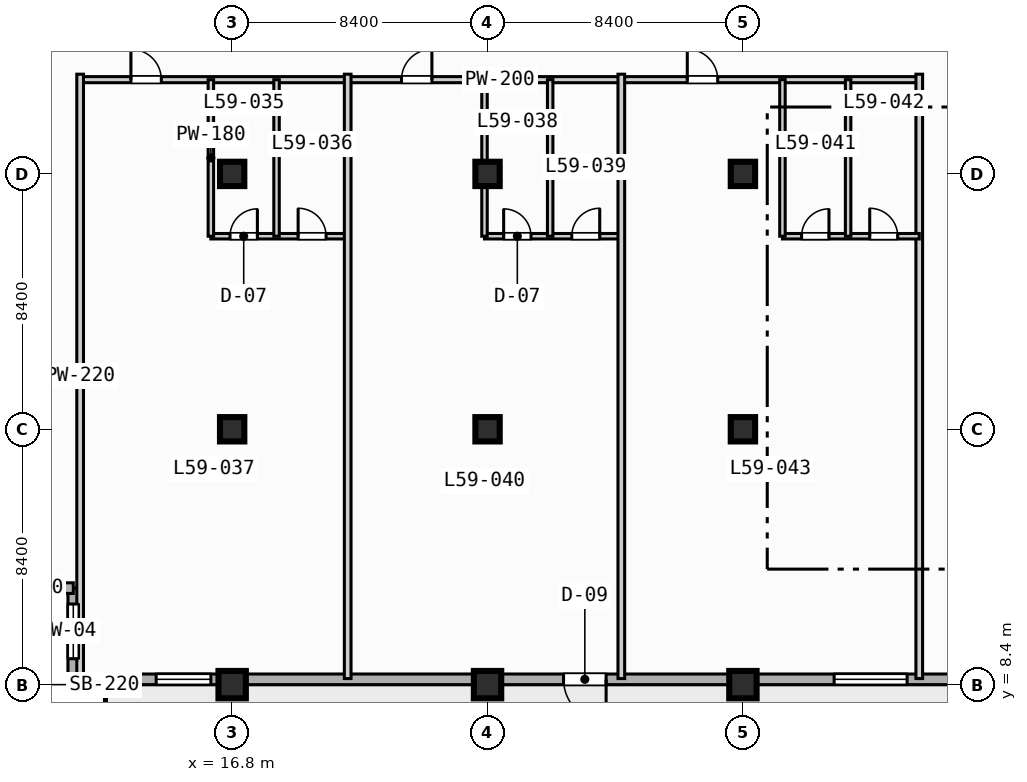
"""IFC4 building model, lengths in metres.
Left out: names, types, materials, properties, quantities, classifications, styles, units other than length and angle.
Written with IfcOpenShell. Run it as: python <this file> out.ifc"""

import sys

from ifc_helpers import new_model, si_unit, direction, frame, frame_2d, origin, origin_2d, place, context, subcontext, project, spatial, rectangle, extrude, element, fill, save


model = new_model("IFC4")
c1 = context("Model", 3, precision=1e-05, world=origin(), true_north=direction((0.0, 1.0)))
c2 = subcontext(c1, "Body", "Model", "MODEL_VIEW")
j1 = project(units=[si_unit("LENGTHUNIT", "METRE"), si_unit("PLANEANGLEUNIT", "RADIAN")], contexts=[c1])
p1 = place(None, origin())
s1 = spatial("IfcSite", under=j1, at=p1, CompositionType="ELEMENT")
p2 = place(p1, origin())
s2 = spatial("IfcBuilding", under=s1, at=p2, CompositionType="ELEMENT")
p3 = place(p2, frame((0.0, 0.0, 241.6)))
s3 = spatial("IfcBuildingStorey", under=s2, at=p3, CompositionType="ELEMENT", Elevation=241.6)
p4 = place(p3, frame((16.8, 8.4, 0.0), z_axis=(0.0, 0.0, 1.0), x_axis=(1.0, 0.0, 0.0)))
e1 = element("IfcColumn", 1, at=p4, inside=s3, PredefinedType="COLUMN", context=c2, shape_type="SweptSolid", body=[
    extrude(rectangle(XDim=0.9, YDim=0.9, at=origin_2d()), origin(), (0.0, 0.0, 1.0), 3.7),
])
for number, where, z_axis, x_axis in (
    (2, (16.8, 16.8, 0.0), (0.0, 0.0, 1.0), (1.0, 0.0, 0.0)),
    (3, (16.8, 25.2, 0.0), (0.0, 0.0, 1.0), (1.0, 0.0, 0.0)),
):
    element("IfcColumn", number, at=place(p3, frame(where, z_axis=z_axis, x_axis=x_axis)), inside=s3, PredefinedType="COLUMN", context=c2, shape_type="SweptSolid", body=[
        extrude(rectangle(XDim=0.8, YDim=0.8, at=origin_2d()), origin(), (0.0, 0.0, 1.0), 3.7),
    ])
p5 = place(p3, frame((25.2, 8.4, 0.0), z_axis=(0.0, 0.0, 1.0), x_axis=(1.0, 0.0, 0.0)))
e4 = element("IfcColumn", 4, at=p5, inside=s3, PredefinedType="COLUMN", context=c2, shape_type="SweptSolid", body=[
    extrude(rectangle(XDim=0.9, YDim=0.9, at=origin_2d()), origin(), (0.0, 0.0, 1.0), 3.7),
])
for number, where, z_axis, x_axis in (
    (5, (25.2, 16.8, 0.0), (0.0, 0.0, 1.0), (1.0, 0.0, 0.0)),
    (6, (25.2, 25.2, 0.0), (0.0, 0.0, 1.0), (1.0, 0.0, 0.0)),
):
    element("IfcColumn", number, at=place(p3, frame(where, z_axis=z_axis, x_axis=x_axis)), inside=s3, PredefinedType="COLUMN", context=c2, shape_type="SweptSolid", body=[
        extrude(rectangle(XDim=0.8, YDim=0.8, at=origin_2d()), origin(), (0.0, 0.0, 1.0), 3.7),
    ])
p6 = place(p3, frame((33.6, 8.4, 0.0), z_axis=(0.0, 0.0, 1.0), x_axis=(1.0, 0.0, 0.0)))
e7 = element("IfcColumn", 7, at=p6, inside=s3, PredefinedType="COLUMN", context=c2, shape_type="SweptSolid", body=[
    extrude(rectangle(XDim=0.9, YDim=0.9, at=origin_2d()), origin(), (0.0, 0.0, 1.0), 3.7),
])
for number, where, z_axis, x_axis in (
    (8, (33.6, 16.8, 0.0), (0.0, 0.0, 1.0), (1.0, 0.0, 0.0)),
    (9, (33.6, 25.2, 0.0), (0.0, 0.0, 1.0), (1.0, 0.0, 0.0)),
):
    element("IfcColumn", number, at=place(p3, frame(where, z_axis=z_axis, x_axis=x_axis)), inside=s3, PredefinedType="COLUMN", context=c2, shape_type="SweptSolid", body=[
        extrude(rectangle(XDim=0.8, YDim=0.8, at=origin_2d()), origin(), (0.0, 0.0, 1.0), 3.7),
    ])
p7 = place(p3, frame((11.575, 8.575, 0.0), z_axis=(0.0, 0.0, 1.0), x_axis=(0.0, 1.0, 0.0)))
e10 = element("IfcWall", 10, at=p7, inside=s3, PredefinedType="STANDARD", context=c2, shape_type="SweptSolid", body=[
    extrude(rectangle(XDim=3.0, YDim=0.35, at=frame_2d((1.5, 0.0))), origin(), (0.0, 0.0, 1.0), 3.47),
])
p8 = place(p7, frame((0.677, 0.0, 0.85)))
e11 = element("IfcOpeningElement", 11, at=p8, cuts=e10, PredefinedType="OPENING", context=c2, shape_type="SweptSolid", body=[
    extrude(rectangle(XDim=1.8, YDim=1.8, at=frame_2d((0.9, 0.9))), frame((0.0, 0.185, 0.0), z_axis=(0.0, -1.0, 0.0), x_axis=(1.0, 0.0, 0.0)), (0.0, 0.0, 1.0), 0.37),
])
p9 = place(p3, frame((11.575, 11.575, 0.0), z_axis=(0.0, 0.0, 1.0), x_axis=(-1.0, 0.0, 0.0)))
e12 = element("IfcWall", 12, at=p9, inside=s3, PredefinedType="STANDARD", context=c2, shape_type="SweptSolid", body=[
    extrude(rectangle(XDim=3.0, YDim=0.35, at=frame_2d((1.5, 0.0))), origin(), (0.0, 0.0, 1.0), 3.47),
])
p10 = place(p3, frame((72.425, 8.575, 0.0), z_axis=(0.0, 0.0, 1.0), x_axis=(-1.0, 0.0, 0.0)))
e13 = element("IfcWall", 13, at=p10, inside=s3, PredefinedType="STANDARD", context=c2, shape_type="SweptSolid", body=[
    extrude(rectangle(XDim=60.85, YDim=0.35, at=frame_2d((30.425, 0.0))), origin(), (0.0, 0.0, 1.0), 3.47),
])
p11 = place(p10, frame((43.325, 0.0, 0.0)))
e14 = element("IfcOpeningElement", 14, at=p11, cuts=e13, PredefinedType="OPENING", context=c2, shape_type="SweptSolid", body=[
    extrude(rectangle(XDim=1.4, YDim=2.2, at=frame_2d((0.7, 1.1))), frame((0.0, 0.185, 0.0), z_axis=(0.0, -1.0, 0.0), x_axis=(1.0, 0.0, 0.0)), (0.0, 0.0, 1.0), 0.37),
])
p12 = place(p10, frame((33.425, 0.0, 0.85)))
e15 = element("IfcOpeningElement", 15, at=p12, cuts=e13, PredefinedType="OPENING", context=c2, shape_type="SweptSolid", body=[
    extrude(rectangle(XDim=2.4, YDim=1.95, at=frame_2d((1.2, 0.975))), frame((0.0, 0.185, 0.0), z_axis=(0.0, -1.0, 0.0), x_axis=(1.0, 0.0, 0.0)), (0.0, 0.0, 1.0), 0.37),
])
p13 = place(p10, frame((25.325, 0.0, 0.85)))
e16 = element("IfcOpeningElement", 16, at=p13, cuts=e13, PredefinedType="OPENING", context=c2, shape_type="SweptSolid", body=[
    extrude(rectangle(XDim=1.8, YDim=1.8, at=frame_2d((0.9, 0.9))), frame((0.0, 0.185, 0.0), z_axis=(0.0, -1.0, 0.0), x_axis=(1.0, 0.0, 0.0)), (0.0, 0.0, 1.0), 0.37),
])
p14 = place(p10, frame((56.325, 0.0, 0.85)))
e17 = element("IfcOpeningElement", 17, at=p14, cuts=e13, PredefinedType="OPENING", context=c2, shape_type="SweptSolid", body=[
    extrude(rectangle(XDim=1.8, YDim=1.8, at=frame_2d((0.9, 0.9))), frame((0.0, 0.185, 0.0), z_axis=(0.0, -1.0, 0.0), x_axis=(1.0, 0.0, 0.0)), (0.0, 0.0, 1.0), 0.37),
])
p15 = place(p3, frame((11.8, 28.3, 0.0), z_axis=(0.0, 0.0, 1.0), x_axis=(1.0, 0.0, 0.0)))
e18 = element("IfcWall", 18, at=p15, inside=s3, PredefinedType="PARTITIONING", context=c2, shape_type="SweptSolid", body=[
    extrude(rectangle(XDim=27.6, YDim=0.2, at=frame_2d((13.8, 0.0))), origin(), (0.0, 0.0, 1.0), 3.47),
])
p16 = place(p15, frame((1.67, 0.0, 0.0)))
e19 = element("IfcOpeningElement", 19, at=p16, cuts=e18, PredefinedType="OPENING", context=c2, shape_type="SweptSolid", body=[
    extrude(rectangle(XDim=1.0, YDim=2.15, at=frame_2d((0.5, 1.075))), frame((0.0, 0.11, 0.0), z_axis=(0.0, -1.0, 0.0), x_axis=(1.0, 0.0, 0.0)), (0.0, 0.0, 1.0), 0.22),
])
p17 = place(p15, frame((10.57, 0.0, 0.0)))
e20 = element("IfcOpeningElement", 20, at=p17, cuts=e18, PredefinedType="OPENING", context=c2, shape_type="SweptSolid", body=[
    extrude(rectangle(XDim=1.0, YDim=2.15, at=frame_2d((0.5, 1.075))), frame((0.0, 0.11, 0.0), z_axis=(0.0, -1.0, 0.0), x_axis=(1.0, 0.0, 0.0)), (0.0, 0.0, 1.0), 0.22),
])
p18 = place(p15, frame((19.97, 0.0, 0.0)))
e21 = element("IfcOpeningElement", 21, at=p18, cuts=e18, PredefinedType="OPENING", context=c2, shape_type="SweptSolid", body=[
    extrude(rectangle(XDim=1.0, YDim=2.15, at=frame_2d((0.5, 1.075))), frame((0.0, 0.11, 0.0), z_axis=(0.0, -1.0, 0.0), x_axis=(1.0, 0.0, 0.0)), (0.0, 0.0, 1.0), 0.22),
])
p19 = place(p3, frame((11.8, 8.6, 0.0), z_axis=(0.0, 0.0, 1.0), x_axis=(0.0, 1.0, 0.0)))
e22 = element("IfcWall", 22, at=p19, inside=s3, PredefinedType="PARTITIONING", context=c2, shape_type="SweptSolid", body=[
    extrude(rectangle(XDim=19.88, YDim=0.22, at=frame_2d((9.94, 0.0))), origin(), (0.0, 0.0, 1.0), 3.47),
])
p20 = place(p3, frame((16.1, 23.15, 0.0), z_axis=(0.0, 0.0, 1.0), x_axis=(1.0, 0.0, 0.0)))
e23 = element("IfcWall", 23, at=p20, inside=s3, PredefinedType="PLUMBINGWALL", context=c2, shape_type="SweptSolid", body=[
    extrude(rectangle(XDim=4.5, YDim=0.18, at=frame_2d((2.25, 0.0))), origin(), (0.0, 0.0, 1.0), 3.47),
])
p21 = place(p20, frame((0.63, 0.0, 0.0)))
e24 = element("IfcOpeningElement", 24, at=p21, cuts=e23, PredefinedType="OPENING", context=c2, shape_type="SweptSolid", body=[
    extrude(rectangle(XDim=0.9, YDim=2.1, at=frame_2d((0.45, 1.05))), frame((0.0, 0.1, 0.0), z_axis=(0.0, -1.0, 0.0), x_axis=(1.0, 0.0, 0.0)), (0.0, 0.0, 1.0), 0.2),
])
p22 = place(p20, frame((2.87, 0.0, 0.0)))
e25 = element("IfcOpeningElement", 25, at=p22, cuts=e23, PredefinedType="OPENING", context=c2, shape_type="SweptSolid", body=[
    extrude(rectangle(XDim=0.92, YDim=2.1, at=frame_2d((0.46, 1.05))), frame((0.0, 0.1, 0.0), z_axis=(0.0, -1.0, 0.0), x_axis=(1.0, 0.0, 0.0)), (0.0, 0.0, 1.0), 0.2),
])
for number, where, z_axis, x_axis in (
    (26, (16.1, 23.15, 0.0), (0.0, 0.0, 1.0), (0.0, 1.0, 0.0)),
    (27, (18.26, 23.15, 0.0), (0.0, 0.0, 1.0), (0.0, 1.0, 0.0)),
):
    element("IfcWall", number, at=place(p3, frame(where, z_axis=z_axis, x_axis=x_axis)), inside=s3, PredefinedType="PLUMBINGWALL", context=c2, shape_type="SweptSolid", body=[
        extrude(rectangle(XDim=5.15, YDim=0.18, at=frame_2d((2.575, 0.0))), origin(), (0.0, 0.0, 1.0), 3.47),
    ])
p23 = place(p3, frame((20.6, 8.6, 0.0), z_axis=(0.0, 0.0, 1.0), x_axis=(0.0, 1.0, 0.0)))
e28 = element("IfcWall", 28, at=p23, inside=s3, PredefinedType="PARTITIONING", context=c2, shape_type="SweptSolid", body=[
    extrude(rectangle(XDim=19.88, YDim=0.22, at=frame_2d((9.94, 0.0))), origin(), (0.0, 0.0, 1.0), 3.47),
])
p24 = place(p3, frame((25.1, 23.15, 0.0), z_axis=(0.0, 0.0, 1.0), x_axis=(1.0, 0.0, 0.0)))
e29 = element("IfcWall", 29, at=p24, inside=s3, PredefinedType="PLUMBINGWALL", context=c2, shape_type="SweptSolid", body=[
    extrude(rectangle(XDim=4.5, YDim=0.18, at=frame_2d((2.25, 0.0))), origin(), (0.0, 0.0, 1.0), 3.47),
])
p25 = place(p24, frame((0.63, 0.0, 0.0)))
e30 = element("IfcOpeningElement", 30, at=p25, cuts=e29, PredefinedType="OPENING", context=c2, shape_type="SweptSolid", body=[
    extrude(rectangle(XDim=0.9, YDim=2.1, at=frame_2d((0.45, 1.05))), frame((0.0, 0.1, 0.0), z_axis=(0.0, -1.0, 0.0), x_axis=(1.0, 0.0, 0.0)), (0.0, 0.0, 1.0), 0.2),
])
p26 = place(p24, frame((2.87, 0.0, 0.0)))
e31 = element("IfcOpeningElement", 31, at=p26, cuts=e29, PredefinedType="OPENING", context=c2, shape_type="SweptSolid", body=[
    extrude(rectangle(XDim=0.92, YDim=2.1, at=frame_2d((0.46, 1.05))), frame((0.0, 0.1, 0.0), z_axis=(0.0, -1.0, 0.0), x_axis=(1.0, 0.0, 0.0)), (0.0, 0.0, 1.0), 0.2),
])
p27 = place(p3, frame((25.1, 23.15, 0.0), z_axis=(0.0, 0.0, 1.0), x_axis=(0.0, 1.0, 0.0)))
e32 = element("IfcWall", 32, at=p27, inside=s3, PredefinedType="PLUMBINGWALL", context=c2, shape_type="SweptSolid", body=[
    extrude(rectangle(XDim=5.15, YDim=0.18, at=frame_2d((2.575, 0.0))), origin(), (0.0, 0.0, 1.0), 2.82),
])
p28 = place(p3, frame((27.26, 23.15, 0.0), z_axis=(0.0, 0.0, 1.0), x_axis=(0.0, 1.0, 0.0)))
e33 = element("IfcWall", 33, at=p28, inside=s3, PredefinedType="PLUMBINGWALL", context=c2, shape_type="SweptSolid", body=[
    extrude(rectangle(XDim=5.15, YDim=0.18, at=frame_2d((2.575, 0.0))), origin(), (0.0, 0.0, 1.0), 3.47),
])
for number, where, z_axis, x_axis in (
    (34, (29.6, 8.6, 0.0), (0.0, 0.0, 1.0), (0.0, 1.0, 0.0)),
    (35, (39.4, 8.6, 0.0), (0.0, 0.0, 1.0), (0.0, 1.0, 0.0)),
):
    element("IfcWall", number, at=place(p3, frame(where, z_axis=z_axis, x_axis=x_axis)), inside=s3, PredefinedType="PARTITIONING", context=c2, shape_type="SweptSolid", body=[
        extrude(rectangle(XDim=19.88, YDim=0.22, at=frame_2d((9.94, 0.0))), origin(), (0.0, 0.0, 1.0), 3.47),
    ])
p29 = place(p3, frame((34.9, 23.15, 0.0), z_axis=(0.0, 0.0, 1.0), x_axis=(1.0, 0.0, 0.0)))
e36 = element("IfcWall", 36, at=p29, inside=s3, PredefinedType="PLUMBINGWALL", context=c2, shape_type="SweptSolid", body=[
    extrude(rectangle(XDim=4.5, YDim=0.18, at=frame_2d((2.25, 0.0))), origin(), (0.0, 0.0, 1.0), 3.47),
])
p30 = place(p29, frame((0.63, 0.0, 0.0)))
e37 = element("IfcOpeningElement", 37, at=p30, cuts=e36, PredefinedType="OPENING", context=c2, shape_type="SweptSolid", body=[
    extrude(rectangle(XDim=0.9, YDim=2.1, at=frame_2d((0.45, 1.05))), frame((0.0, 0.1, 0.0), z_axis=(0.0, -1.0, 0.0), x_axis=(1.0, 0.0, 0.0)), (0.0, 0.0, 1.0), 0.2),
])
p31 = place(p29, frame((2.87, 0.0, 0.0)))
e38 = element("IfcOpeningElement", 38, at=p31, cuts=e36, PredefinedType="OPENING", context=c2, shape_type="SweptSolid", body=[
    extrude(rectangle(XDim=0.92, YDim=2.1, at=frame_2d((0.46, 1.05))), frame((0.0, 0.1, 0.0), z_axis=(0.0, -1.0, 0.0), x_axis=(1.0, 0.0, 0.0)), (0.0, 0.0, 1.0), 0.2),
])
for number, where, z_axis, x_axis in (
    (39, (34.9, 23.15, 0.0), (0.0, 0.0, 1.0), (0.0, 1.0, 0.0)),
    (40, (37.06, 23.15, 0.0), (0.0, 0.0, 1.0), (0.0, 1.0, 0.0)),
):
    element("IfcWall", number, at=place(p3, frame(where, z_axis=z_axis, x_axis=x_axis)), inside=s3, PredefinedType="PLUMBINGWALL", context=c2, shape_type="SweptSolid", body=[
        extrude(rectangle(XDim=5.15, YDim=0.18, at=frame_2d((2.575, 0.0))), origin(), (0.0, 0.0, 1.0), 3.47),
    ])
p32 = place(p8, origin())
e41 = element("IfcWindow", 41, at=p32, inside=s3, PartitioningType="SINGLE_PANEL", PredefinedType="WINDOW", context=c2, shape_type="SweptSolid", body=[
    extrude(rectangle(XDim=1.8, YDim=1.8, at=frame_2d((0.9, 0.9))), frame((0.0, 0.03, 0.0), z_axis=(0.0, -1.0, 0.0), x_axis=(1.0, 0.0, 0.0)), (0.0, 0.0, 1.0), 0.06),
])
fill(e11, e41)
p33 = place(p11, origin())
e42 = element("IfcDoor", 42, at=p33, inside=s3, OperationType="SINGLE_SWING_LEFT", PredefinedType="DOOR", context=c2, shape_type="SweptSolid", body=[
    extrude(rectangle(XDim=1.4, YDim=2.2, at=frame_2d((0.7, 1.1))), frame((0.0, 0.025, 0.0), z_axis=(0.0, -1.0, 0.0), x_axis=(1.0, 0.0, 0.0)), (0.0, 0.0, 1.0), 0.05),
])
fill(e14, e42)
p34 = place(p12, origin())
e43 = element("IfcWindow", 43, at=p34, inside=s3, PartitioningType="SINGLE_PANEL", PredefinedType="WINDOW", context=c2, shape_type="SweptSolid", body=[
    extrude(rectangle(XDim=2.4, YDim=1.95, at=frame_2d((1.2, 0.975))), frame((0.0, 0.03, 0.0), z_axis=(0.0, -1.0, 0.0), x_axis=(1.0, 0.0, 0.0)), (0.0, 0.0, 1.0), 0.06),
])
fill(e15, e43)
p35 = place(p14, origin())
e44 = element("IfcWindow", 44, at=p35, inside=s3, PartitioningType="SINGLE_PANEL", PredefinedType="WINDOW", context=c2, shape_type="SweptSolid", body=[
    extrude(rectangle(XDim=1.8, YDim=1.8, at=frame_2d((0.9, 0.9))), frame((0.0, 0.03, 0.0), z_axis=(0.0, -1.0, 0.0), x_axis=(1.0, 0.0, 0.0)), (0.0, 0.0, 1.0), 0.06),
])
fill(e17, e44)
p36 = place(p16, origin())
e45 = element("IfcDoor", 45, at=p36, inside=s3, OperationType="SINGLE_SWING_LEFT", PredefinedType="DOOR", context=c2, shape_type="SweptSolid", body=[
    extrude(rectangle(XDim=1.0, YDim=2.15, at=frame_2d((0.5, 1.075))), frame((0.0, 0.025, 0.0), z_axis=(0.0, -1.0, 0.0), x_axis=(1.0, 0.0, 0.0)), (0.0, 0.0, 1.0), 0.05),
])
fill(e19, e45)
p37 = place(p17, origin())
e46 = element("IfcDoor", 46, at=p37, inside=s3, OperationType="SINGLE_SWING_RIGHT", PredefinedType="DOOR", context=c2, shape_type="SweptSolid", body=[
    extrude(rectangle(XDim=1.0, YDim=2.15, at=frame_2d((0.5, 1.075))), frame((0.0, 0.025, 0.0), z_axis=(0.0, -1.0, 0.0), x_axis=(1.0, 0.0, 0.0)), (0.0, 0.0, 1.0), 0.05),
])
fill(e20, e46)
p38 = place(p18, origin())
e47 = element("IfcDoor", 47, at=p38, inside=s3, OperationType="SINGLE_SWING_LEFT", PredefinedType="DOOR", context=c2, shape_type="SweptSolid", body=[
    extrude(rectangle(XDim=1.0, YDim=2.15, at=frame_2d((0.5, 1.075))), frame((0.0, 0.025, 0.0), z_axis=(0.0, -1.0, 0.0), x_axis=(1.0, 0.0, 0.0)), (0.0, 0.0, 1.0), 0.05),
])
fill(e21, e47)
p39 = place(p21, origin())
e48 = element("IfcDoor", 48, at=p39, inside=s3, OperationType="SINGLE_SWING_RIGHT", PredefinedType="DOOR", context=c2, shape_type="SweptSolid", body=[
    extrude(rectangle(XDim=0.9, YDim=2.1, at=frame_2d((0.45, 1.05))), frame((0.0, 0.025, 0.0), z_axis=(0.0, -1.0, 0.0), x_axis=(1.0, 0.0, 0.0)), (0.0, 0.0, 1.0), 0.05),
])
fill(e24, e48)
p40 = place(p22, origin())
e49 = element("IfcDoor", 49, at=p40, inside=s3, OperationType="SINGLE_SWING_LEFT", PredefinedType="DOOR", context=c2, shape_type="SweptSolid", body=[
    extrude(rectangle(XDim=0.92, YDim=2.1, at=frame_2d((0.46, 1.05))), frame((0.0, 0.025, 0.0), z_axis=(0.0, -1.0, 0.0), x_axis=(1.0, 0.0, 0.0)), (0.0, 0.0, 1.0), 0.05),
])
fill(e25, e49)
p41 = place(p25, origin())
e50 = element("IfcDoor", 50, at=p41, inside=s3, OperationType="SINGLE_SWING_LEFT", PredefinedType="DOOR", context=c2, shape_type="SweptSolid", body=[
    extrude(rectangle(XDim=0.9, YDim=2.1, at=frame_2d((0.45, 1.05))), frame((0.0, 0.025, 0.0), z_axis=(0.0, -1.0, 0.0), x_axis=(1.0, 0.0, 0.0)), (0.0, 0.0, 1.0), 0.05),
])
fill(e30, e50)
p42 = place(p26, origin())
e51 = element("IfcDoor", 51, at=p42, inside=s3, OperationType="SINGLE_SWING_RIGHT", PredefinedType="DOOR", context=c2, shape_type="SweptSolid", body=[
    extrude(rectangle(XDim=0.92, YDim=2.1, at=frame_2d((0.46, 1.05))), frame((0.0, 0.025, 0.0), z_axis=(0.0, -1.0, 0.0), x_axis=(1.0, 0.0, 0.0)), (0.0, 0.0, 1.0), 0.05),
])
fill(e31, e51)
p43 = place(p30, origin())
e52 = element("IfcDoor", 52, at=p43, inside=s3, OperationType="SINGLE_SWING_RIGHT", PredefinedType="DOOR", context=c2, shape_type="SweptSolid", body=[
    extrude(rectangle(XDim=0.9, YDim=2.1, at=frame_2d((0.45, 1.05))), frame((0.0, 0.025, 0.0), z_axis=(0.0, -1.0, 0.0), x_axis=(1.0, 0.0, 0.0)), (0.0, 0.0, 1.0), 0.05),
])
fill(e37, e52)
p44 = place(p31, origin())
e53 = element("IfcDoor", 53, at=p44, inside=s3, OperationType="SINGLE_SWING_LEFT", PredefinedType="DOOR", context=c2, shape_type="SweptSolid", body=[
    extrude(rectangle(XDim=0.92, YDim=2.1, at=frame_2d((0.46, 1.05))), frame((0.0, 0.025, 0.0), z_axis=(0.0, -1.0, 0.0), x_axis=(1.0, 0.0, 0.0)), (0.0, 0.0, 1.0), 0.05),
])
fill(e38, e53)
save(model, sys.argv[1])
